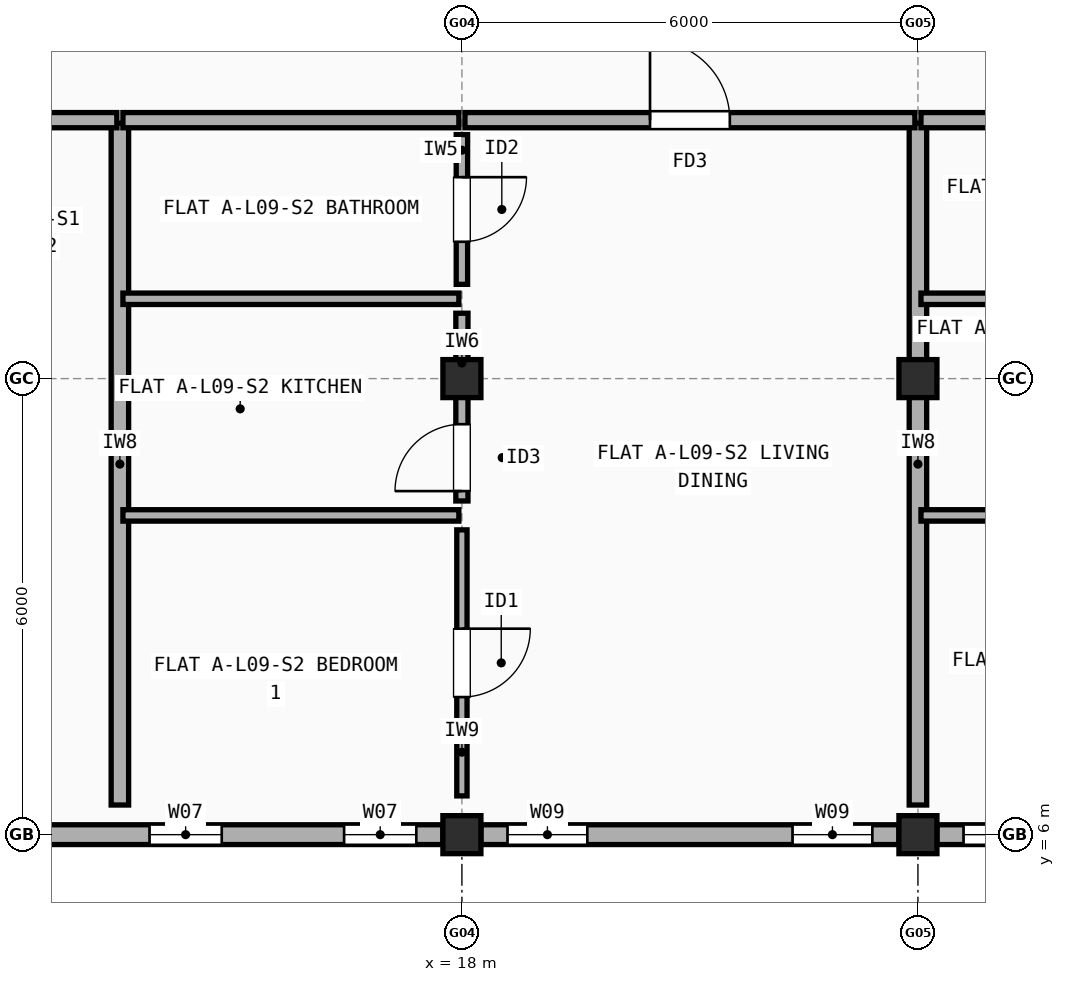
"""IFC4 building model, lengths in metres.
Left out: names, types, materials, properties, quantities, classifications, styles, units other than length and angle.
Written with IfcOpenShell. Run it as: python <this file> out.ifc"""

import sys

from ifc_helpers import new_model, si_unit, direction, frame, frame_2d, origin, origin_2d, place, context, subcontext, project, spatial, rectangle, extrude, element, fill, save


model = new_model("IFC4")
c1 = context("Model", 3, precision=1e-05, world=origin(), true_north=direction((0.0, 1.0)))
c2 = subcontext(c1, "Body", "Model", "MODEL_VIEW")
j1 = project(units=[si_unit("LENGTHUNIT", "METRE"), si_unit("PLANEANGLEUNIT", "RADIAN")], contexts=[c1])
p1 = place(None, origin())
s1 = spatial("IfcSite", under=j1, at=p1, CompositionType="ELEMENT")
p2 = place(p1, origin())
s2 = spatial("IfcBuilding", under=s1, at=p2, CompositionType="ELEMENT")
p3 = place(p2, frame((0.0, 0.0, 30.1)))
s3 = spatial("IfcBuildingStorey", under=s2, at=p3, CompositionType="ELEMENT", Elevation=30.1)
for number, where, z_axis, x_axis in (
    (1, (18.0, 6.0, 0.0), (0.0, 0.0, 1.0), (1.0, 0.0, 0.0)),
    (2, (18.0, 12.0, 0.0), (0.0, 0.0, 1.0), (1.0, 0.0, 0.0)),
    (3, (24.0, 6.0, 0.0), (0.0, 0.0, 1.0), (1.0, 0.0, 0.0)),
    (4, (24.0, 12.0, 0.0), (0.0, 0.0, 1.0), (1.0, 0.0, 0.0)),
):
    element("IfcColumn", number, at=place(p3, frame(where, z_axis=z_axis, x_axis=x_axis)), inside=s3, PredefinedType="COLUMN", context=c2, shape_type="SweptSolid", body=[
        extrude(rectangle(XDim=0.5, YDim=0.5, at=origin_2d()), origin(), (0.0, 0.0, 1.0), 2.985),
    ])
p4 = place(p3, frame((12.25, 6.0, 0.0), z_axis=(0.0, 0.0, 1.0), x_axis=(1.0, 0.0, 0.0)))
e5 = element("IfcWall", 5, at=p4, inside=s3, PredefinedType="STANDARD", context=c2, shape_type="SweptSolid", body=[
    extrude(rectangle(XDim=5.5, YDim=0.26, at=frame_2d((2.75, 0.0))), origin(), (0.0, 0.0, 1.0), 2.467),
])
p5 = place(p4, frame((1.64, 0.0, 0.9)))
e6 = element("IfcOpeningElement", 6, at=p5, cuts=e5, PredefinedType="OPENING", context=c2, shape_type="SweptSolid", body=[
    extrude(rectangle(XDim=0.95, YDim=1.35, at=frame_2d((0.475, 0.675))), frame((0.0, 0.14, 0.0), z_axis=(0.0, -1.0, 0.0), x_axis=(1.0, 0.0, 0.0)), (0.0, 0.0, 1.0), 0.28),
])
p6 = place(p4, frame((4.2, 0.0, 0.9)))
e7 = element("IfcOpeningElement", 7, at=p6, cuts=e5, PredefinedType="OPENING", context=c2, shape_type="SweptSolid", body=[
    extrude(rectangle(XDim=0.95, YDim=1.35, at=frame_2d((0.475, 0.675))), frame((0.0, 0.14, 0.0), z_axis=(0.0, -1.0, 0.0), x_axis=(1.0, 0.0, 0.0)), (0.0, 0.0, 1.0), 0.28),
])
p7 = place(p3, frame((18.25, 6.0, 0.0), z_axis=(0.0, 0.0, 1.0), x_axis=(1.0, 0.0, 0.0)))
e8 = element("IfcWall", 8, at=p7, inside=s3, PredefinedType="STANDARD", context=c2, shape_type="SweptSolid", body=[
    extrude(rectangle(XDim=5.5, YDim=0.26, at=frame_2d((2.75, 0.0))), origin(), (0.0, 0.0, 1.0), 2.467),
])
p8 = place(p7, frame((0.35, 0.0, 0.9)))
e9 = element("IfcOpeningElement", 9, at=p8, cuts=e8, PredefinedType="OPENING", context=c2, shape_type="SweptSolid", body=[
    extrude(rectangle(XDim=1.05, YDim=1.35, at=frame_2d((0.525, 0.675))), frame((0.0, 0.14, 0.0), z_axis=(0.0, -1.0, 0.0), x_axis=(1.0, 0.0, 0.0)), (0.0, 0.0, 1.0), 0.28),
])
p9 = place(p7, frame((4.1, 0.0, 0.9)))
e10 = element("IfcOpeningElement", 10, at=p9, cuts=e8, PredefinedType="OPENING", context=c2, shape_type="SweptSolid", body=[
    extrude(rectangle(XDim=1.05, YDim=1.35, at=frame_2d((0.525, 0.675))), frame((0.0, 0.14, 0.0), z_axis=(0.0, -1.0, 0.0), x_axis=(1.0, 0.0, 0.0)), (0.0, 0.0, 1.0), 0.28),
])
p10 = place(p3, frame((24.25, 6.0, 0.0), z_axis=(0.0, 0.0, 1.0), x_axis=(1.0, 0.0, 0.0)))
e11 = element("IfcWall", 11, at=p10, inside=s3, PredefinedType="STANDARD", context=c2, shape_type="SweptSolid", body=[
    extrude(rectangle(XDim=5.525, YDim=0.26, at=frame_2d((2.762, 0.0))), origin(), (0.0, 0.0, 1.0), 2.467),
])
p11 = place(p10, frame((0.35, 0.0, 0.9)))
e12 = element("IfcOpeningElement", 12, at=p11, cuts=e11, PredefinedType="OPENING", context=c2, shape_type="SweptSolid", body=[
    extrude(rectangle(XDim=1.5, YDim=1.4, at=frame_2d((0.75, 0.7))), frame((0.0, 0.14, 0.0), z_axis=(0.0, -1.0, 0.0), x_axis=(1.0, 0.0, 0.0)), (0.0, 0.0, 1.0), 0.28),
])
p12 = place(p10, frame((2.36, 0.0, 0.9)))
e13 = element("IfcOpeningElement", 13, at=p12, cuts=e11, PredefinedType="OPENING", context=c2, shape_type="SweptSolid", body=[
    extrude(rectangle(XDim=1.5, YDim=1.4, at=frame_2d((0.75, 0.7))), frame((0.0, 0.14, 0.0), z_axis=(0.0, -1.0, 0.0), x_axis=(1.0, 0.0, 0.0)), (0.0, 0.0, 1.0), 0.28),
])
p13 = place(p3, frame((13.5, 6.39, 0.0), z_axis=(0.0, 0.0, 1.0), x_axis=(0.0, 1.0, 0.0)))
e14 = element("IfcWall", 14, at=p13, inside=s3, PredefinedType="SOLIDWALL", context=c2, shape_type="SweptSolid", body=[
    extrude(rectangle(XDim=8.97, YDim=0.23, at=frame_2d((4.485, 0.0))), origin(), (0.0, 0.0, 1.0), 2.508),
])
p14 = place(p3, frame((10.54, 15.4, 0.0), z_axis=(0.0, 0.0, 1.0), x_axis=(1.0, 0.0, 0.0)))
e15 = element("IfcWall", 15, at=p14, inside=s3, PredefinedType="SOLIDWALL", context=c2, shape_type="SweptSolid", body=[
    extrude(rectangle(XDim=2.92, YDim=0.2, at=frame_2d((1.46, 0.0))), origin(), (0.0, 0.0, 1.0), 2.508),
])
p15 = place(p3, frame((24.0, 6.39, 0.0), z_axis=(0.0, 0.0, 1.0), x_axis=(0.0, 1.0, 0.0)))
e16 = element("IfcWall", 16, at=p15, inside=s3, PredefinedType="SOLIDWALL", context=c2, shape_type="SweptSolid", body=[
    extrude(rectangle(XDim=8.97, YDim=0.23, at=frame_2d((4.485, 0.0))), origin(), (0.0, 0.0, 1.0), 2.458),
])
p16 = place(p3, frame((13.54, 15.4, 0.0), z_axis=(0.0, 0.0, 1.0), x_axis=(1.0, 0.0, 0.0)))
e17 = element("IfcWall", 17, at=p16, inside=s3, PredefinedType="SOLIDWALL", context=c2, shape_type="SweptSolid", body=[
    extrude(rectangle(XDim=4.42, YDim=0.2, at=frame_2d((2.21, 0.0))), origin(), (0.0, 0.0, 1.0), 2.458),
])
p17 = place(p3, frame((18.04, 15.4, 0.0), z_axis=(0.0, 0.0, 1.0), x_axis=(1.0, 0.0, 0.0)))
e18 = element("IfcWall", 18, at=p17, inside=s3, PredefinedType="SOLIDWALL", context=c2, shape_type="SweptSolid", body=[
    extrude(rectangle(XDim=5.92, YDim=0.2, at=frame_2d((2.96, 0.0))), origin(), (0.0, 0.0, 1.0), 2.458),
])
p18 = place(p17, frame((2.435, 0.0, 0.0)))
e19 = element("IfcOpeningElement", 19, at=p18, cuts=e18, PredefinedType="OPENING", context=c2, shape_type="SweptSolid", body=[
    extrude(rectangle(XDim=1.05, YDim=2.15, at=frame_2d((0.525, 1.075))), frame((0.0, 0.11, 0.0), z_axis=(0.0, -1.0, 0.0), x_axis=(1.0, 0.0, 0.0)), (0.0, 0.0, 1.0), 0.22),
])
p19 = place(p3, frame((18.0, 6.51, 0.0), z_axis=(0.0, 0.0, 1.0), x_axis=(0.0, 1.0, 0.0)))
e20 = element("IfcWall", 20, at=p19, inside=s3, PredefinedType="PARTITIONING", context=c2, shape_type="SweptSolid", body=[
    extrude(rectangle(XDim=3.5, YDim=0.135, at=frame_2d((1.75, 0.0))), origin(), (0.0, 0.0, 1.0), 2.508),
])
p20 = place(p19, frame((1.3, 0.0, 0.0)))
e21 = element("IfcOpeningElement", 21, at=p20, cuts=e20, PredefinedType="OPENING", context=c2, shape_type="SweptSolid", body=[
    extrude(rectangle(XDim=0.9, YDim=2.1, at=frame_2d((0.45, 1.05))), frame((0.0, 0.077, 0.0), z_axis=(0.0, -1.0, 0.0), x_axis=(1.0, 0.0, 0.0)), (0.0, 0.0, 1.0), 0.155),
])
p21 = place(p3, frame((18.0, 10.39, 0.0), z_axis=(0.0, 0.0, 1.0), x_axis=(0.0, 1.0, 0.0)))
e22 = element("IfcWall", 22, at=p21, inside=s3, PredefinedType="PLUMBINGWALL", context=c2, shape_type="SweptSolid", body=[
    extrude(rectangle(XDim=2.47, YDim=0.16, at=frame_2d((1.235, 0.0))), origin(), (0.0, 0.0, 1.0), 2.458),
])
p22 = place(p21, frame((0.13, 0.0, 0.0)))
e23 = element("IfcOpeningElement", 23, at=p22, cuts=e22, PredefinedType="OPENING", context=c2, shape_type="SweptSolid", body=[
    extrude(rectangle(XDim=0.88, YDim=2.1, at=frame_2d((0.44, 1.05))), frame((0.0, 0.09, 0.0), z_axis=(0.0, -1.0, 0.0), x_axis=(1.0, 0.0, 0.0)), (0.0, 0.0, 1.0), 0.18),
])
p23 = place(p3, frame((18.0, 13.24, 0.0), z_axis=(0.0, 0.0, 1.0), x_axis=(0.0, 1.0, 0.0)))
e24 = element("IfcWall", 24, at=p23, inside=s3, PredefinedType="PARTITIONING", context=c2, shape_type="SweptSolid", body=[
    extrude(rectangle(XDim=1.97, YDim=0.15, at=frame_2d((0.985, 0.0))), origin(), (0.0, 0.0, 1.0), 2.458),
])
p24 = place(p23, frame((0.56, 0.0, 0.0)))
e25 = element("IfcOpeningElement", 25, at=p24, cuts=e24, PredefinedType="OPENING", context=c2, shape_type="SweptSolid", body=[
    extrude(rectangle(XDim=0.85, YDim=2.1, at=frame_2d((0.425, 1.05))), frame((0.0, 0.085, 0.0), z_axis=(0.0, -1.0, 0.0), x_axis=(1.0, 0.0, 0.0)), (0.0, 0.0, 1.0), 0.17),
])
p25 = place(p3, frame((13.54, 10.2, 0.0), z_axis=(0.0, 0.0, 1.0), x_axis=(1.0, 0.0, 0.0)))
e26 = element("IfcWall", 26, at=p25, inside=s3, PredefinedType="PARTITIONING", context=c2, shape_type="SweptSolid", body=[
    extrude(rectangle(XDim=4.42, YDim=0.15, at=frame_2d((2.21, 0.0))), origin(), (0.0, 0.0, 1.0), 2.508),
])
p26 = place(p3, frame((13.54, 13.05, 0.0), z_axis=(0.0, 0.0, 1.0), x_axis=(1.0, 0.0, 0.0)))
e27 = element("IfcWall", 27, at=p26, inside=s3, PredefinedType="PARTITIONING", context=c2, shape_type="SweptSolid", body=[
    extrude(rectangle(XDim=4.42, YDim=0.15, at=frame_2d((2.21, 0.0))), origin(), (0.0, 0.0, 1.0), 2.458),
])
p27 = place(p3, frame((24.04, 15.4, 0.0), z_axis=(0.0, 0.0, 1.0), x_axis=(1.0, 0.0, 0.0)))
e28 = element("IfcWall", 28, at=p27, inside=s3, PredefinedType="SOLIDWALL", context=c2, shape_type="SweptSolid", body=[
    extrude(rectangle(XDim=4.42, YDim=0.2, at=frame_2d((2.21, 0.0))), origin(), (0.0, 0.0, 1.0), 2.458),
])
p28 = place(p3, frame((24.04, 10.2, 0.0), z_axis=(0.0, 0.0, 1.0), x_axis=(1.0, 0.0, 0.0)))
e29 = element("IfcWall", 29, at=p28, inside=s3, PredefinedType="PARTITIONING", context=c2, shape_type="SweptSolid", body=[
    extrude(rectangle(XDim=4.42, YDim=0.15, at=frame_2d((2.21, 0.0))), origin(), (0.0, 0.0, 1.0), 2.508),
])
p29 = place(p3, frame((24.04, 13.05, 0.0), z_axis=(0.0, 0.0, 1.0), x_axis=(1.0, 0.0, 0.0)))
e30 = element("IfcWall", 30, at=p29, inside=s3, PredefinedType="PARTITIONING", context=c2, shape_type="SweptSolid", body=[
    extrude(rectangle(XDim=4.42, YDim=0.15, at=frame_2d((2.21, 0.0))), origin(), (0.0, 0.0, 1.0), 2.458),
])
p30 = place(p5, origin())
e31 = element("IfcWindow", 31, at=p30, inside=s3, PartitioningType="SINGLE_PANEL", PredefinedType="WINDOW", context=c2, shape_type="SweptSolid", body=[
    extrude(rectangle(XDim=0.95, YDim=1.35, at=frame_2d((0.475, 0.675))), frame((0.0, 0.03, 0.0), z_axis=(0.0, -1.0, 0.0), x_axis=(1.0, 0.0, 0.0)), (0.0, 0.0, 1.0), 0.06),
])
fill(e6, e31)
p31 = place(p6, origin())
e32 = element("IfcWindow", 32, at=p31, inside=s3, PartitioningType="SINGLE_PANEL", PredefinedType="WINDOW", context=c2, shape_type="SweptSolid", body=[
    extrude(rectangle(XDim=0.95, YDim=1.35, at=frame_2d((0.475, 0.675))), frame((0.0, 0.03, 0.0), z_axis=(0.0, -1.0, 0.0), x_axis=(1.0, 0.0, 0.0)), (0.0, 0.0, 1.0), 0.06),
])
fill(e7, e32)
p32 = place(p8, origin())
e33 = element("IfcWindow", 33, at=p32, inside=s3, PartitioningType="SINGLE_PANEL", PredefinedType="WINDOW", context=c2, shape_type="SweptSolid", body=[
    extrude(rectangle(XDim=1.05, YDim=1.35, at=frame_2d((0.525, 0.675))), frame((0.0, 0.03, 0.0), z_axis=(0.0, -1.0, 0.0), x_axis=(1.0, 0.0, 0.0)), (0.0, 0.0, 1.0), 0.06),
])
fill(e9, e33)
p33 = place(p9, origin())
e34 = element("IfcWindow", 34, at=p33, inside=s3, PartitioningType="SINGLE_PANEL", PredefinedType="WINDOW", context=c2, shape_type="SweptSolid", body=[
    extrude(rectangle(XDim=1.05, YDim=1.35, at=frame_2d((0.525, 0.675))), frame((0.0, 0.03, 0.0), z_axis=(0.0, -1.0, 0.0), x_axis=(1.0, 0.0, 0.0)), (0.0, 0.0, 1.0), 0.06),
])
fill(e10, e34)
p34 = place(p11, origin())
e35 = element("IfcWindow", 35, at=p34, inside=s3, PartitioningType="SINGLE_PANEL", PredefinedType="WINDOW", context=c2, shape_type="SweptSolid", body=[
    extrude(rectangle(XDim=1.5, YDim=1.4, at=frame_2d((0.75, 0.7))), frame((0.0, 0.03, 0.0), z_axis=(0.0, -1.0, 0.0), x_axis=(1.0, 0.0, 0.0)), (0.0, 0.0, 1.0), 0.06),
])
fill(e12, e35)
p35 = place(p18, origin())
e36 = element("IfcDoor", 36, at=p35, inside=s3, OperationType="SINGLE_SWING_LEFT", PredefinedType="DOOR", context=c2, shape_type="SweptSolid", body=[
    extrude(rectangle(XDim=1.05, YDim=2.15, at=frame_2d((0.525, 1.075))), frame((0.0, 0.025, 0.0), z_axis=(0.0, -1.0, 0.0), x_axis=(1.0, 0.0, 0.0)), (0.0, 0.0, 1.0), 0.05),
])
fill(e19, e36)
p36 = place(p20, origin())
e37 = element("IfcDoor", 37, at=p36, inside=s3, OperationType="SINGLE_SWING_RIGHT", PredefinedType="DOOR", context=c2, shape_type="SweptSolid", body=[
    extrude(rectangle(XDim=0.9, YDim=2.1, at=frame_2d((0.45, 1.05))), frame((0.0, 0.025, 0.0), z_axis=(0.0, -1.0, 0.0), x_axis=(1.0, 0.0, 0.0)), (0.0, 0.0, 1.0), 0.05),
])
fill(e21, e37)
p37 = place(p22, origin())
e38 = element("IfcDoor", 38, at=p37, inside=s3, OperationType="SINGLE_SWING_LEFT", PredefinedType="DOOR", context=c2, shape_type="SweptSolid", body=[
    extrude(rectangle(XDim=0.88, YDim=2.1, at=frame_2d((0.44, 1.05))), frame((0.0, 0.025, 0.0), z_axis=(0.0, -1.0, 0.0), x_axis=(1.0, 0.0, 0.0)), (0.0, 0.0, 1.0), 0.05),
])
fill(e23, e38)
p38 = place(p24, origin())
e39 = element("IfcDoor", 39, at=p38, inside=s3, OperationType="SINGLE_SWING_RIGHT", PredefinedType="DOOR", context=c2, shape_type="SweptSolid", body=[
    extrude(rectangle(XDim=0.85, YDim=2.1, at=frame_2d((0.425, 1.05))), frame((0.0, 0.025, 0.0), z_axis=(0.0, -1.0, 0.0), x_axis=(1.0, 0.0, 0.0)), (0.0, 0.0, 1.0), 0.05),
])
fill(e25, e39)
save(model, sys.argv[1])
